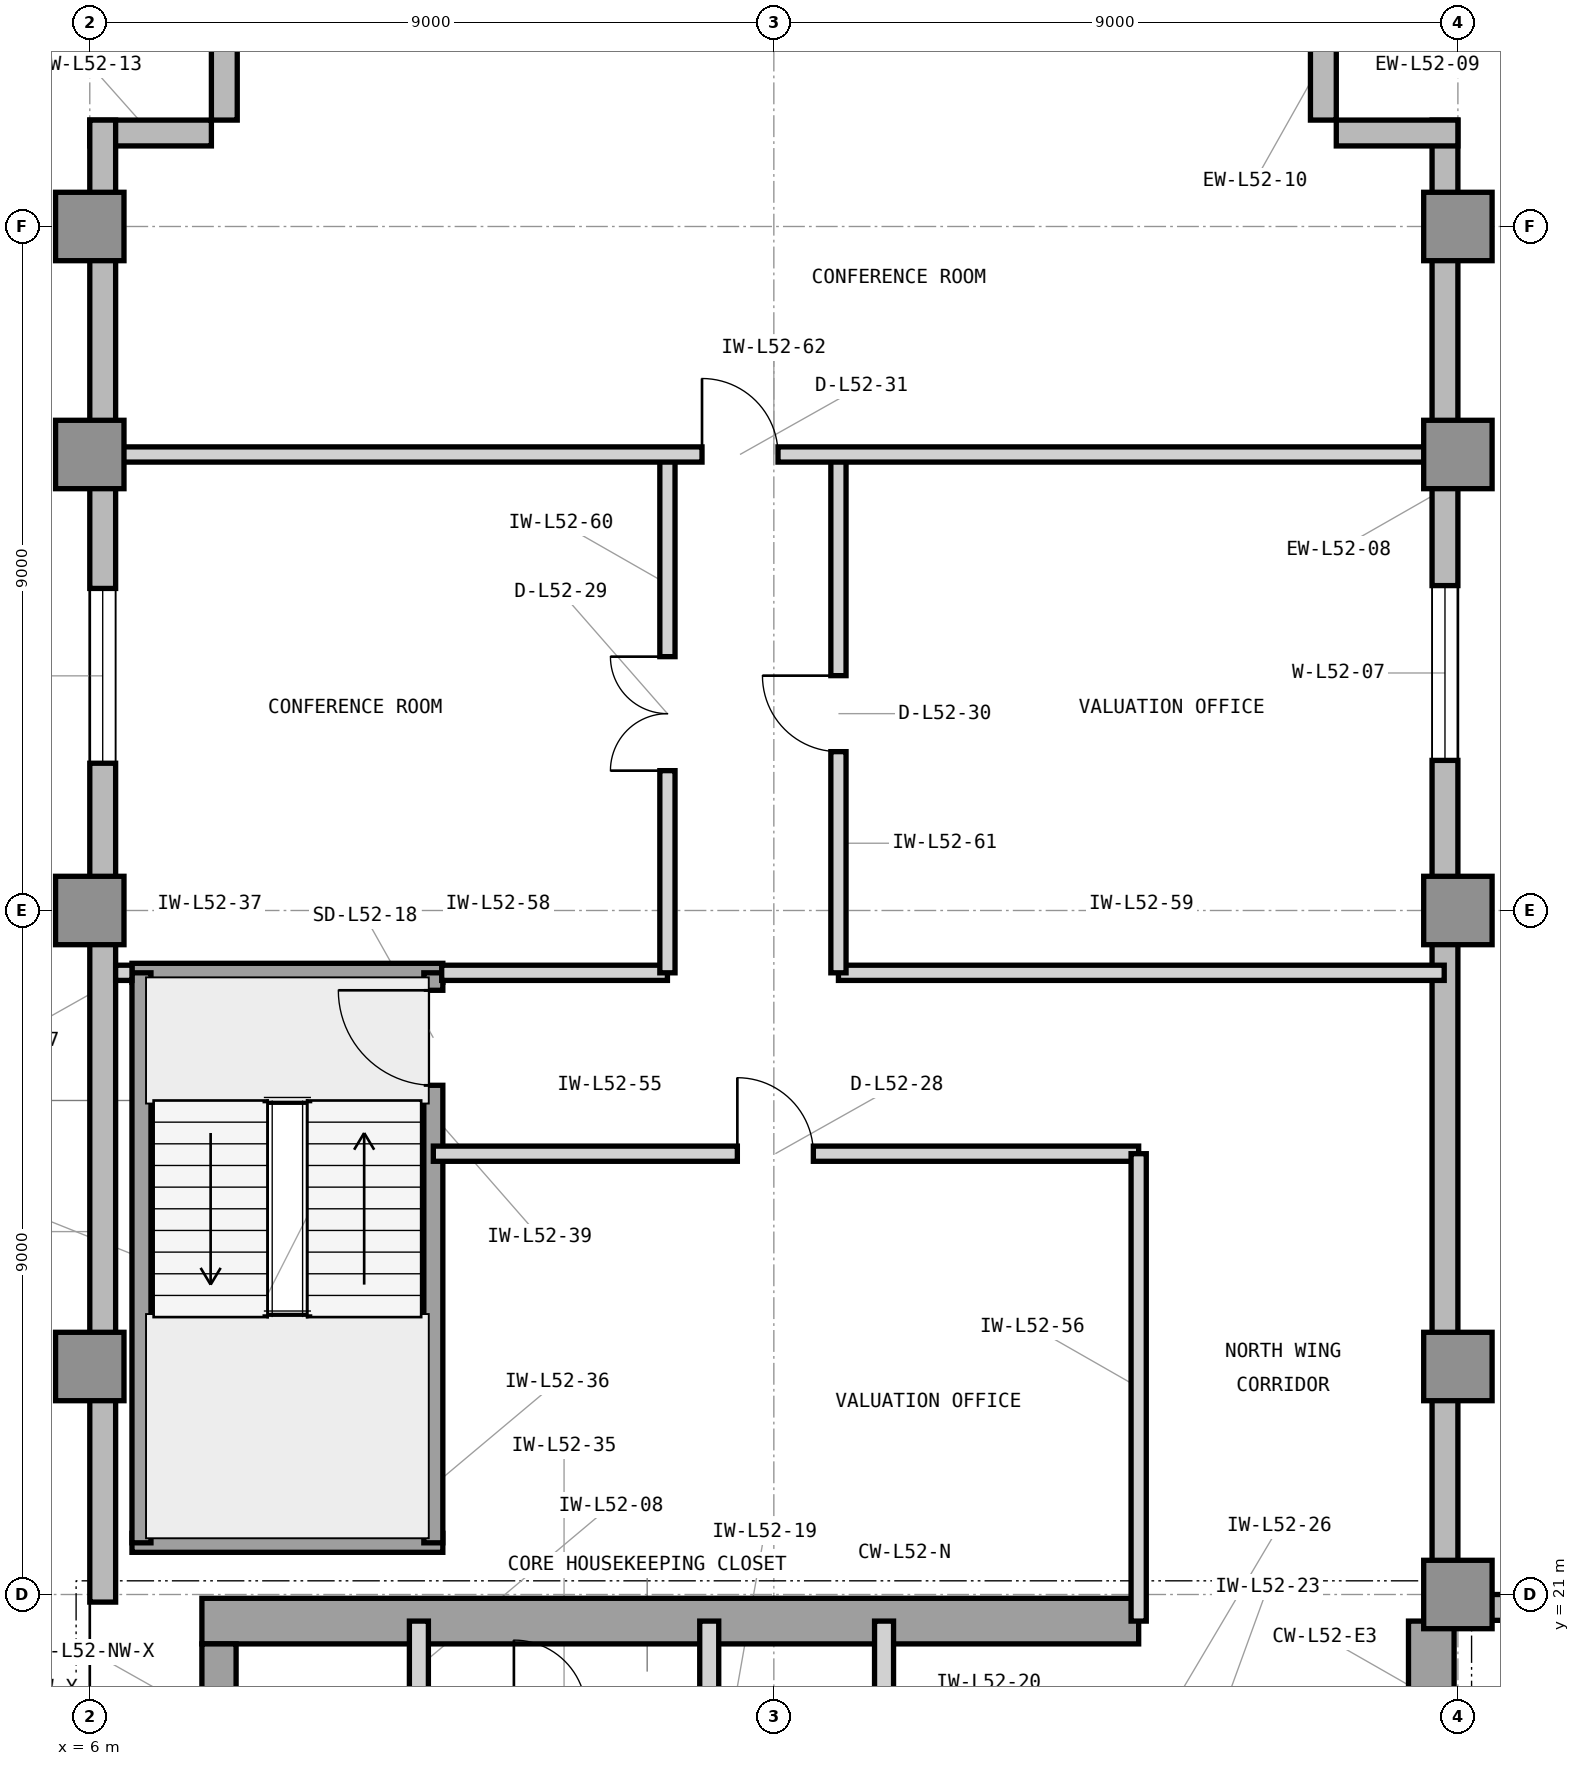
"""IFC4 building model, lengths in metres.
Left out: names, types, materials, properties, quantities, classifications, styles, units other than length and angle.
Written with IfcOpenShell. Run it as: python <this file> out.ifc"""

import sys

from ifc_helpers import new_model, si_unit, direction, frame, frame_2d, origin, origin_2d, place, context, subcontext, project, spatial, rectangle, extrude, element, fill, save


model = new_model("IFC4")
c1 = context("Model", 3, precision=1e-05, world=origin(), true_north=direction((0.0, 1.0)))
c2 = subcontext(c1, "Body", "Model", "MODEL_VIEW")
j1 = project(units=[si_unit("LENGTHUNIT", "METRE"), si_unit("PLANEANGLEUNIT", "RADIAN")], contexts=[c1])
p1 = place(None, origin())
s1 = spatial("IfcSite", under=j1, at=p1, CompositionType="ELEMENT")
p2 = place(p1, origin())
s2 = spatial("IfcBuilding", under=s1, at=p2, CompositionType="ELEMENT")
p3 = place(p2, frame((0.0, 0.0, 215.1)))
s3 = spatial("IfcBuildingStorey", under=s2, at=p3, CompositionType="ELEMENT", Elevation=215.1)
p4 = place(p3, frame((7.475, 20.65, 0.0), z_axis=(0.0, 0.0, 1.0), x_axis=(1.0, 0.0, 0.0)))
e1 = element("IfcWall", 1, at=p4, inside=s3, PredefinedType="SHEAR", context=c2, shape_type="SweptSolid", body=[
    extrude(rectangle(XDim=12.325, YDim=0.6, at=frame_2d((6.163, 0.0))), origin(), (0.0, 0.0, 1.0), 3.9),
])
p5 = place(p3, frame((23.65, 16.6, 0.0), z_axis=(0.0, 0.0, 1.0), x_axis=(0.0, 1.0, 0.0)))
e2 = element("IfcWall", 2, at=p5, inside=s3, PredefinedType="SHEAR", context=c2, shape_type="SweptSolid", body=[
    extrude(rectangle(XDim=4.05, YDim=0.6, at=frame_2d((2.025, 0.0))), origin(), (0.0, 0.0, 1.0), 3.9),
])
p6 = place(p3, frame((7.7, 19.575, 0.0), z_axis=(0.0, 0.0, 1.0), x_axis=(0.0, 1.0, 0.0)))
e3 = element("IfcWall", 3, at=p6, inside=s3, PredefinedType="SHEAR", context=c2, shape_type="SweptSolid", body=[
    extrude(rectangle(XDim=0.775, YDim=0.45, at=frame_2d((0.388, 0.0))), origin(), (0.0, 0.0, 1.0), 3.9),
])
for number, where, z_axis, x_axis in (
    (4, (24.0, 21.0, 0.0), (0.0, 0.0, 1.0), (1.0, 0.0, 0.0)),
    (5, (6.0, 24.0, 0.0), (0.0, 0.0, 1.0), (1.0, 0.0, 0.0)),
    (6, (24.0, 24.0, 0.0), (0.0, 0.0, 1.0), (1.0, 0.0, 0.0)),
    (7, (6.0, 30.0, 0.0), (0.0, 0.0, 1.0), (1.0, 0.0, 0.0)),
    (8, (24.0, 30.0, 0.0), (0.0, 0.0, 1.0), (1.0, 0.0, 0.0)),
    (9, (6.0, 36.0, 0.0), (0.0, 0.0, 1.0), (1.0, 0.0, 0.0)),
    (10, (24.0, 36.0, 0.0), (0.0, 0.0, 1.0), (1.0, 0.0, 0.0)),
    (11, (6.0, 39.0, 0.0), (0.0, 0.0, 1.0), (1.0, 0.0, 0.0)),
    (12, (24.0, 39.0, 0.0), (0.0, 0.0, 1.0), (1.0, 0.0, 0.0)),
):
    element("IfcColumn", number, at=place(p3, frame(where, z_axis=z_axis, x_axis=x_axis)), inside=s3, PredefinedType="COLUMN", context=c2, shape_type="SweptSolid", body=[
        extrude(rectangle(XDim=0.9, YDim=0.9, at=origin_2d()), origin(), (0.0, 0.0, 1.0), 3.9),
    ])
p7 = place(p3, frame((55.4, 20.83, 0.0), z_axis=(0.0, 0.0, 1.0), x_axis=(-1.0, 0.0, 0.0)))
e13 = element("IfcWall", 13, at=p7, inside=s3, PredefinedType="STANDARD", context=c2, shape_type="SweptSolid", body=[
    extrude(rectangle(XDim=31.4, YDim=0.34, at=frame_2d((15.7, 0.0))), origin(), (0.0, 0.0, 1.0), 3.7),
])
p8 = place(p7, frame((17.167, 0.0, 0.9)))
e14 = element("IfcOpeningElement", 14, at=p8, cuts=e13, PredefinedType="OPENING", context=c2, shape_type="SweptSolid", body=[
    extrude(rectangle(XDim=2.3, YDim=2.2, at=frame_2d((1.15, 1.1))), frame((0.0, 0.18, 0.0), z_axis=(0.0, -1.0, 0.0), x_axis=(1.0, 0.0, 0.0)), (0.0, 0.0, 1.0), 0.36),
])
p9 = place(p7, frame((29.046, 0.0, 0.9)))
e15 = element("IfcOpeningElement", 15, at=p9, cuts=e13, PredefinedType="OPENING", context=c2, shape_type="SweptSolid", body=[
    extrude(rectangle(XDim=1.6, YDim=2.2, at=frame_2d((0.8, 1.1))), frame((0.0, 0.18, 0.0), z_axis=(0.0, -1.0, 0.0), x_axis=(1.0, 0.0, 0.0)), (0.0, 0.0, 1.0), 0.36),
])
p10 = place(p7, frame((8.925, 0.0, 0.9)))
e16 = element("IfcOpeningElement", 16, at=p10, cuts=e13, PredefinedType="OPENING", context=c2, shape_type="SweptSolid", body=[
    extrude(rectangle(XDim=2.3, YDim=2.2, at=frame_2d((1.15, 1.1))), frame((0.0, 0.18, 0.0), z_axis=(0.0, -1.0, 0.0), x_axis=(1.0, 0.0, 0.0)), (0.0, 0.0, 1.0), 0.36),
])
p11 = place(p3, frame((23.83, 21.0, 0.0), z_axis=(0.0, 0.0, 1.0), x_axis=(0.0, 1.0, 0.0)))
e17 = element("IfcWall", 17, at=p11, inside=s3, PredefinedType="STANDARD", context=c2, shape_type="SweptSolid", body=[
    extrude(rectangle(XDim=19.4, YDim=0.34, at=frame_2d((9.7, 0.0))), origin(), (0.0, 0.0, 1.0), 3.7),
])
p12 = place(p11, frame((10.975, 0.0, 0.9)))
e18 = element("IfcOpeningElement", 18, at=p12, cuts=e17, PredefinedType="OPENING", context=c2, shape_type="SweptSolid", body=[
    extrude(rectangle(XDim=2.3, YDim=2.2, at=frame_2d((1.15, 1.1))), frame((0.0, 0.18, 0.0), z_axis=(0.0, -1.0, 0.0), x_axis=(1.0, 0.0, 0.0)), (0.0, 0.0, 1.0), 0.36),
])
for number, where, z_axis, x_axis in (
    (19, (24.0, 40.23, 0.0), (0.0, 0.0, 1.0), (-1.0, 0.0, 0.0)),
    (20, (22.23, 40.4, 0.0), (0.0, 0.0, 1.0), (0.0, 1.0, 0.0)),
    (21, (7.77, 42.0, 0.0), (0.0, 0.0, 1.0), (0.0, -1.0, 0.0)),
    (22, (7.6, 40.23, 0.0), (0.0, 0.0, 1.0), (-1.0, 0.0, 0.0)),
):
    element("IfcWall", number, at=place(p3, frame(where, z_axis=z_axis, x_axis=x_axis)), inside=s3, PredefinedType="STANDARD", context=c2, shape_type="SweptSolid", body=[
        extrude(rectangle(XDim=1.6, YDim=0.34, at=frame_2d((0.8, 0.0))), origin(), (0.0, 0.0, 1.0), 3.7),
    ])
p13 = place(p3, frame((6.17, 40.4, 0.0), z_axis=(0.0, 0.0, 1.0), x_axis=(0.0, -1.0, 0.0)))
e23 = element("IfcWall", 23, at=p13, inside=s3, PredefinedType="STANDARD", context=c2, shape_type="SweptSolid", body=[
    extrude(rectangle(XDim=19.5, YDim=0.34, at=frame_2d((9.75, 0.0))), origin(), (0.0, 0.0, 1.0), 3.7),
])
p14 = place(p13, frame((6.163, 0.0, 0.9)))
e24 = element("IfcOpeningElement", 24, at=p14, cuts=e23, PredefinedType="OPENING", context=c2, shape_type="SweptSolid", body=[
    extrude(rectangle(XDim=2.3, YDim=2.2, at=frame_2d((1.15, 1.1))), frame((0.0, 0.18, 0.0), z_axis=(0.0, -1.0, 0.0), x_axis=(1.0, 0.0, 0.0)), (0.0, 0.0, 1.0), 0.36),
])
p15 = place(p3, frame((10.33, 19.45, 0.0), z_axis=(0.0, 0.0, 1.0), x_axis=(0.0, 1.0, 0.0)))
e25 = element("IfcWall", 25, at=p15, inside=s3, PredefinedType="PARTITIONING", context=c2, shape_type="SweptSolid", body=[
    extrude(rectangle(XDim=1.2, YDim=0.25, at=frame_2d((0.6, 0.0))), origin(), (0.0, 0.0, 1.0), 3.69),
])
for number, where, z_axis, x_axis in (
    (26, (14.15, 16.7, 0.0), (0.0, 0.0, 1.0), (0.0, 1.0, 0.0)),
    (27, (16.45, 16.7, 0.0), (0.0, 0.0, 1.0), (0.0, 1.0, 0.0)),
):
    element("IfcWall", number, at=place(p3, frame(where, z_axis=z_axis, x_axis=x_axis)), inside=s3, PredefinedType="PARTITIONING", context=c2, shape_type="SweptSolid", body=[
        extrude(rectangle(XDim=3.95, YDim=0.25, at=frame_2d((1.975, 0.0))), origin(), (0.0, 0.0, 1.0), 3.69),
    ])
for number, where, z_axis, x_axis in (
    (28, (6.555, 21.68, 0.0), (0.0, 0.0, 1.0), (1.0, 0.0, 0.0)),
    (29, (6.555, 29.18, 0.0), (0.0, 0.0, 1.0), (1.0, 0.0, 0.0)),
):
    element("IfcWall", number, at=place(p3, frame(where, z_axis=z_axis, x_axis=x_axis)), inside=s3, PredefinedType="SHEAR", context=c2, shape_type="SweptSolid", body=[
        extrude(rectangle(XDim=4.09, YDim=0.25, at=frame_2d((2.045, 0.0))), origin(), (0.0, 0.0, 1.0), 3.9),
    ])
p16 = place(p3, frame((6.68, 21.68, 0.0), z_axis=(0.0, 0.0, 1.0), x_axis=(0.0, 1.0, 0.0)))
e30 = element("IfcWall", 30, at=p16, inside=s3, PredefinedType="SHEAR", context=c2, shape_type="SweptSolid", body=[
    extrude(rectangle(XDim=7.5, YDim=0.25, at=frame_2d((3.75, 0.0))), origin(), (0.0, 0.0, 1.0), 3.9),
])
p17 = place(p3, frame((10.52, 21.68, 0.0), z_axis=(0.0, 0.0, 1.0), x_axis=(0.0, 1.0, 0.0)))
e31 = element("IfcWall", 31, at=p17, inside=s3, PredefinedType="SHEAR", context=c2, shape_type="SweptSolid", body=[
    extrude(rectangle(XDim=7.5, YDim=0.25, at=frame_2d((3.75, 0.0))), origin(), (0.0, 0.0, 1.0), 3.9),
])
p18 = place(p17, frame((6.02, 0.0, 0.0)))
e32 = element("IfcOpeningElement", 32, at=p18, cuts=e31, PredefinedType="OPENING", context=c2, shape_type="SweptSolid", body=[
    extrude(rectangle(XDim=1.25, YDim=2.2, at=frame_2d((0.625, 1.1))), frame((0.0, 0.135, 0.0), z_axis=(0.0, -1.0, 0.0), x_axis=(1.0, 0.0, 0.0)), (0.0, 0.0, 1.0), 0.27),
])
p19 = place(p3, frame((10.52, 26.8, 0.0), z_axis=(0.0, 0.0, 1.0), x_axis=(1.0, 0.0, 0.0)))
e33 = element("IfcWall", 33, at=p19, inside=s3, PredefinedType="PARTITIONING", context=c2, shape_type="SweptSolid", body=[
    extrude(rectangle(XDim=9.28, YDim=0.2, at=frame_2d((4.64, 0.0))), origin(), (0.0, 0.0, 1.0), 3.69),
])
p20 = place(p19, frame((4.0, 0.0, 0.0)))
e34 = element("IfcOpeningElement", 34, at=p20, cuts=e33, PredefinedType="OPENING", context=c2, shape_type="SweptSolid", body=[
    extrude(rectangle(XDim=1.0, YDim=2.15, at=frame_2d((0.5, 1.075))), frame((0.0, 0.11, 0.0), z_axis=(0.0, -1.0, 0.0), x_axis=(1.0, 0.0, 0.0)), (0.0, 0.0, 1.0), 0.22),
])
p21 = place(p3, frame((19.8, 20.65, 0.0), z_axis=(0.0, 0.0, 1.0), x_axis=(0.0, 1.0, 0.0)))
e35 = element("IfcWall", 35, at=p21, inside=s3, PredefinedType="PARTITIONING", context=c2, shape_type="SweptSolid", body=[
    extrude(rectangle(XDim=6.15, YDim=0.2, at=frame_2d((3.075, 0.0))), origin(), (0.0, 0.0, 1.0), 3.69),
])
p22 = place(p3, frame((6.34, 29.18, 0.0), z_axis=(0.0, 0.0, 1.0), x_axis=(1.0, 0.0, 0.0)))
e36 = element("IfcWall", 36, at=p22, inside=s3, PredefinedType="PARTITIONING", context=c2, shape_type="SweptSolid", body=[
    extrude(rectangle(XDim=0.215, YDim=0.2, at=frame_2d((0.107, 0.0))), origin(), (0.0, 0.0, 1.0), 3.69),
])
p23 = place(p3, frame((10.63, 29.18, 0.0), z_axis=(0.0, 0.0, 1.0), x_axis=(1.0, 0.0, 0.0)))
e37 = element("IfcWall", 37, at=p23, inside=s3, PredefinedType="PARTITIONING", context=c2, shape_type="SweptSolid", body=[
    extrude(rectangle(XDim=2.97, YDim=0.2, at=frame_2d((1.485, 0.0))), origin(), (0.0, 0.0, 1.0), 3.69),
])
p24 = place(p3, frame((15.85, 29.18, 0.0), z_axis=(0.0, 0.0, 1.0), x_axis=(1.0, 0.0, 0.0)))
e38 = element("IfcWall", 38, at=p24, inside=s3, PredefinedType="PARTITIONING", context=c2, shape_type="SweptSolid", body=[
    extrude(rectangle(XDim=7.97, YDim=0.2, at=frame_2d((3.985, 0.0))), origin(), (0.0, 0.0, 1.0), 3.69),
])
p25 = place(p3, frame((13.6, 29.18, 0.0), z_axis=(0.0, 0.0, 1.0), x_axis=(0.0, 1.0, 0.0)))
e39 = element("IfcWall", 39, at=p25, inside=s3, PredefinedType="PARTITIONING", context=c2, shape_type="SweptSolid", body=[
    extrude(rectangle(XDim=6.82, YDim=0.2, at=frame_2d((3.41, 0.0))), origin(), (0.0, 0.0, 1.0), 3.69),
])
p26 = place(p25, frame((2.66, 0.0, 0.0)))
e40 = element("IfcOpeningElement", 40, at=p26, cuts=e39, PredefinedType="OPENING", context=c2, shape_type="SweptSolid", body=[
    extrude(rectangle(XDim=1.5, YDim=2.3, at=frame_2d((0.75, 1.15))), frame((0.0, 0.11, 0.0), z_axis=(0.0, -1.0, 0.0), x_axis=(1.0, 0.0, 0.0)), (0.0, 0.0, 1.0), 0.22),
])
p27 = place(p3, frame((15.85, 29.18, 0.0), z_axis=(0.0, 0.0, 1.0), x_axis=(0.0, 1.0, 0.0)))
e41 = element("IfcWall", 41, at=p27, inside=s3, PredefinedType="PARTITIONING", context=c2, shape_type="SweptSolid", body=[
    extrude(rectangle(XDim=6.82, YDim=0.2, at=frame_2d((3.41, 0.0))), origin(), (0.0, 0.0, 1.0), 3.69),
])
p28 = place(p27, frame((2.91, 0.0, 0.0)))
e42 = element("IfcOpeningElement", 42, at=p28, cuts=e41, PredefinedType="OPENING", context=c2, shape_type="SweptSolid", body=[
    extrude(rectangle(XDim=1.0, YDim=2.15, at=frame_2d((0.5, 1.075))), frame((0.0, 0.11, 0.0), z_axis=(0.0, -1.0, 0.0), x_axis=(1.0, 0.0, 0.0)), (0.0, 0.0, 1.0), 0.22),
])
p29 = place(p3, frame((6.18, 36.0, 0.0), z_axis=(0.0, 0.0, 1.0), x_axis=(1.0, 0.0, 0.0)))
e43 = element("IfcWall", 43, at=p29, inside=s3, PredefinedType="PARTITIONING", context=c2, shape_type="SweptSolid", body=[
    extrude(rectangle(XDim=17.64, YDim=0.2, at=frame_2d((8.82, 0.0))), origin(), (0.0, 0.0, 1.0), 3.073),
])
p30 = place(p29, frame((7.875, 0.0, 0.0)))
e44 = element("IfcOpeningElement", 44, at=p30, cuts=e43, PredefinedType="OPENING", context=c2, shape_type="SweptSolid", body=[
    extrude(rectangle(XDim=1.0, YDim=2.15, at=frame_2d((0.5, 1.075))), frame((0.0, 0.11, 0.0), z_axis=(0.0, -1.0, 0.0), x_axis=(1.0, 0.0, 0.0)), (0.0, 0.0, 1.0), 0.22),
])
p31 = place(p12, origin())
e45 = element("IfcWindow", 45, at=p31, inside=s3, PartitioningType="SINGLE_PANEL", PredefinedType="WINDOW", context=c2, shape_type="SweptSolid", body=[
    extrude(rectangle(XDim=2.3, YDim=2.2, at=frame_2d((1.15, 1.1))), frame((0.0, 0.11, 0.0), z_axis=(0.0, -1.0, 0.0), x_axis=(1.0, 0.0, 0.0)), (0.0, 0.0, 1.0), 0.06),
])
fill(e18, e45)
p32 = place(p14, origin())
e46 = element("IfcWindow", 46, at=p32, inside=s3, PartitioningType="SINGLE_PANEL", PredefinedType="WINDOW", context=c2, shape_type="SweptSolid", body=[
    extrude(rectangle(XDim=2.3, YDim=2.2, at=frame_2d((1.15, 1.1))), frame((0.0, 0.11, 0.0), z_axis=(0.0, -1.0, 0.0), x_axis=(1.0, 0.0, 0.0)), (0.0, 0.0, 1.0), 0.06),
])
fill(e24, e46)
p33 = place(p18, origin())
e47 = element("IfcDoor", 47, at=p33, inside=s3, OperationType="SINGLE_SWING_RIGHT", PredefinedType="DOOR", context=c2, shape_type="SweptSolid", body=[
    extrude(rectangle(XDim=1.25, YDim=2.2, at=frame_2d((0.625, 1.1))), frame((0.0, 0.025, 0.0), z_axis=(0.0, -1.0, 0.0), x_axis=(1.0, 0.0, 0.0)), (0.0, 0.0, 1.0), 0.05),
])
fill(e32, e47)
p34 = place(p20, origin())
e48 = element("IfcDoor", 48, at=p34, inside=s3, OperationType="SINGLE_SWING_LEFT", PredefinedType="DOOR", context=c2, shape_type="SweptSolid", body=[
    extrude(rectangle(XDim=1.0, YDim=2.15, at=frame_2d((0.5, 1.075))), frame((0.0, 0.025, 0.0), z_axis=(0.0, -1.0, 0.0), x_axis=(1.0, 0.0, 0.0)), (0.0, 0.0, 1.0), 0.05),
])
fill(e34, e48)
p35 = place(p26, origin())
e49 = element("IfcDoor", 49, at=p35, inside=s3, OperationType="DOUBLE_DOOR_SINGLE_SWING", PredefinedType="DOOR", context=c2, shape_type="SweptSolid", body=[
    extrude(rectangle(XDim=1.5, YDim=2.3, at=frame_2d((0.75, 1.15))), frame((0.0, 0.025, 0.0), z_axis=(0.0, -1.0, 0.0), x_axis=(1.0, 0.0, 0.0)), (0.0, 0.0, 1.0), 0.05),
])
fill(e40, e49)
p36 = place(p28, origin())
e50 = element("IfcDoor", 50, at=p36, inside=s3, OperationType="SINGLE_SWING_RIGHT", PredefinedType="DOOR", context=c2, shape_type="SweptSolid", body=[
    extrude(rectangle(XDim=1.0, YDim=2.15, at=frame_2d((0.5, 1.075))), frame((0.0, 0.025, 0.0), z_axis=(0.0, -1.0, 0.0), x_axis=(1.0, 0.0, 0.0)), (0.0, 0.0, 1.0), 0.05),
])
fill(e42, e50)
p37 = place(p30, origin())
e51 = element("IfcDoor", 51, at=p37, inside=s3, OperationType="SINGLE_SWING_LEFT", PredefinedType="DOOR", context=c2, shape_type="SweptSolid", body=[
    extrude(rectangle(XDim=1.0, YDim=2.15, at=frame_2d((0.5, 1.075))), frame((0.0, 0.025, 0.0), z_axis=(0.0, -1.0, 0.0), x_axis=(1.0, 0.0, 0.0)), (0.0, 0.0, 1.0), 0.05),
])
fill(e44, e51)
save(model, sys.argv[1])
